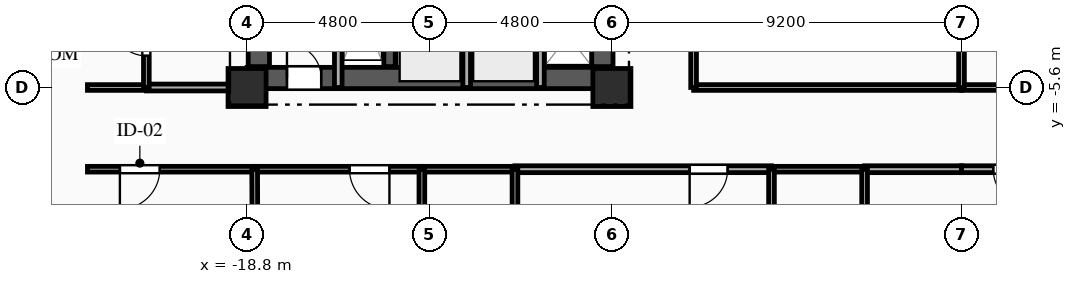
"""IFC4 building model, lengths in metres.
Left out: names, types, materials, properties, quantities, classifications, styles, units other than length and angle.
Written with IfcOpenShell. Run it as: python <this file> out.ifc"""

import sys

from ifc_helpers import new_model, si_unit, direction, frame, frame_2d, origin, origin_2d, place, context, subcontext, project, spatial, rectangle, extrude, element, fill, save


model = new_model("IFC4")
c1 = context("Model", 3, precision=1e-05, world=origin(), true_north=direction((0.0, 1.0)))
c2 = subcontext(c1, "Body", "Model", "MODEL_VIEW")
j1 = project(units=[si_unit("LENGTHUNIT", "METRE"), si_unit("PLANEANGLEUNIT", "RADIAN")], contexts=[c1])
p1 = place(None, origin())
s1 = spatial("IfcSite", under=j1, at=p1, CompositionType="ELEMENT")
p2 = place(p1, origin())
s2 = spatial("IfcBuilding", under=s1, at=p2, CompositionType="ELEMENT")
p3 = place(p2, frame((0.0, 0.0, 89.05)))
s3 = spatial("IfcBuildingStorey", under=s2, at=p3, CompositionType="ELEMENT", Elevation=89.05)
for number, where, z_axis, x_axis in (
    (1, (-18.8, -5.6, 0.0), (0.0, 0.0, 1.0), (1.0, 0.0, 0.0)),
    (2, (-9.2, -5.6, 0.0), (0.0, 0.0, 1.0), (1.0, 0.0, 0.0)),
):
    element("IfcColumn", number, at=place(p3, frame(where, z_axis=z_axis, x_axis=x_axis)), inside=s3, PredefinedType="COLUMN", context=c2, shape_type="SweptSolid", body=[
        extrude(rectangle(XDim=1.0, YDim=1.0, at=origin_2d()), origin(), (0.0, 0.0, 1.0), 3.35),
    ])
p4 = place(p3, frame((-18.8, -5.35, 0.0), z_axis=(0.0, 0.0, 1.0), x_axis=(1.0, 0.0, 0.0)))
e3 = element("IfcWall", 3, at=p4, inside=s3, PredefinedType="SHEAR", context=c2, shape_type="SweptSolid", body=[
    extrude(rectangle(XDim=9.6, YDim=0.56, at=frame_2d((4.8, 0.0))), origin(), (0.0, 0.0, 1.0), 3.045),
])
p5 = place(p4, frame((1.05, 0.0, 0.0)))
e4 = element("IfcOpeningElement", 4, at=p5, cuts=e3, PredefinedType="OPENING", context=c2, shape_type="SweptSolid", body=[
    extrude(rectangle(XDim=0.9, YDim=2.1, at=frame_2d((0.45, 1.05))), frame((0.0, 0.29, 0.0), z_axis=(0.0, -1.0, 0.0), x_axis=(1.0, 0.0, 0.0)), (0.0, 0.0, 1.0), 0.58),
])
p6 = place(p3, frame((-18.49, -5.05, 0.0), z_axis=(0.0, 0.0, 1.0), x_axis=(0.0, 1.0, 0.0)))
e5 = element("IfcWall", 5, at=p6, inside=s3, PredefinedType="SHEAR", context=c2, shape_type="SweptSolid", body=[
    extrude(rectangle(XDim=10.1, YDim=0.56, at=frame_2d((5.05, 0.0))), origin(), (0.0, 0.0, 1.0), 3.045),
])
p7 = place(p3, frame((-9.45, -5.05, 0.0), z_axis=(0.0, 0.0, 1.0), x_axis=(0.0, 1.0, 0.0)))
e6 = element("IfcWall", 6, at=p7, inside=s3, PredefinedType="SHEAR", context=c2, shape_type="SweptSolid", body=[
    extrude(rectangle(XDim=10.1, YDim=0.56, at=frame_2d((5.05, 0.0))), origin(), (0.0, 0.0, 1.0), 3.045),
])
p8 = place(p7, frame((7.15, 0.0, 0.0)))
e7 = element("IfcOpeningElement", 7, at=p8, cuts=e6, PredefinedType="OPENING", context=c2, shape_type="SweptSolid", body=[
    extrude(rectangle(XDim=0.9, YDim=2.1, at=frame_2d((0.45, 1.05))), frame((0.0, 0.29, 0.0), z_axis=(0.0, -1.0, 0.0), x_axis=(1.0, 0.0, 0.0)), (0.0, 0.0, 1.0), 0.58),
])
p9 = place(p7, frame((2.4, 0.0, 0.0)))
e8 = element("IfcOpeningElement", 8, at=p9, cuts=e6, PredefinedType="OPENING", context=c2, shape_type="SweptSolid", body=[
    extrude(rectangle(XDim=1.2, YDim=2.15, at=frame_2d((0.6, 1.075))), frame((0.0, 0.29, 0.0), z_axis=(0.0, -1.0, 0.0), x_axis=(1.0, 0.0, 0.0)), (0.0, 0.0, 1.0), 0.58),
])
p10 = place(p3, frame((-15.05, -5.05, 0.0), z_axis=(0.0, 0.0, 1.0), x_axis=(0.0, 1.0, 0.0)))
e9 = element("IfcWall", 9, at=p10, inside=s3, PredefinedType="SHEAR", context=c2, shape_type="SweptSolid", body=[
    extrude(rectangle(XDim=10.1, YDim=0.3, at=frame_2d((5.05, 0.0))), origin(), (0.0, 0.0, 1.0), 3.045),
])
p11 = place(p3, frame((-16.4, -5.6, 0.0), z_axis=(0.0, 0.0, 1.0), x_axis=(0.0, 1.0, 0.0)))
e10 = element("IfcWall", 10, at=p11, inside=s3, PredefinedType="PARTITIONING", context=c2, shape_type="SweptSolid", body=[
    extrude(rectangle(XDim=3.49, YDim=0.2, at=frame_2d((1.745, 0.0))), origin(), (0.0, 0.0, 1.0), 3.045),
])
for number, where, z_axis, x_axis in (
    (11, (-13.02, -5.6, 0.0), (0.0, 0.0, 1.0), (0.0, 1.0, 0.0)),
    (12, (-11.08, -5.6, 0.0), (0.0, 0.0, 1.0), (0.0, 1.0, 0.0)),
):
    element("IfcWall", number, at=place(p3, frame(where, z_axis=z_axis, x_axis=x_axis)), inside=s3, PredefinedType="PARTITIONING", context=c2, shape_type="SweptSolid", body=[
        extrude(rectangle(XDim=2.25, YDim=0.2, at=frame_2d((1.125, 0.0))), origin(), (0.0, 0.0, 1.0), 3.045),
    ])
p12 = place(p3, frame((-21.45, -5.6, 0.0), z_axis=(0.0, 0.0, 1.0), x_axis=(1.0, 0.0, 0.0)))
e13 = element("IfcWall", 13, at=p12, inside=s3, PredefinedType="PARTITIONING", context=c2, shape_type="SweptSolid", body=[
    extrude(rectangle(XDim=2.65, YDim=0.18, at=frame_2d((1.325, 0.0))), origin(), (0.0, 0.0, 1.0), 3.045),
])
p13 = place(p3, frame((-23.0, -5.6, 0.0), z_axis=(0.0, 0.0, 1.0), x_axis=(1.0, 0.0, 0.0)))
e14 = element("IfcWall", 14, at=p13, inside=s3, PredefinedType="PLUMBINGWALL", context=c2, shape_type="SweptSolid", body=[
    extrude(rectangle(XDim=1.55, YDim=0.15, at=frame_2d((0.775, 0.0))), origin(), (0.0, 0.0, 1.0), 3.045),
])
p14 = place(p3, frame((-18.6, -7.75, 0.0), z_axis=(0.0, 0.0, 1.0), x_axis=(-1.0, 0.0, 0.0)))
e15 = element("IfcWall", 15, at=p14, inside=s3, PredefinedType="PARTITIONING", context=c2, shape_type="SweptSolid", body=[
    extrude(rectangle(XDim=4.4, YDim=0.15, at=frame_2d((2.2, 0.0))), origin(), (0.0, 0.0, 1.0), 3.045),
])
p15 = place(p14, frame((2.496, 0.0, 0.0)))
e16 = element("IfcOpeningElement", 16, at=p15, cuts=e15, PredefinedType="OPENING", context=c2, shape_type="SweptSolid", body=[
    extrude(rectangle(XDim=1.05, YDim=2.15, at=frame_2d((0.525, 1.075))), frame((0.0, 0.085, 0.0), z_axis=(0.0, -1.0, 0.0), x_axis=(1.0, 0.0, 0.0)), (0.0, 0.0, 1.0), 0.17),
])
p16 = place(p3, frame((-14.2, -7.75, 0.0), z_axis=(0.0, 0.0, 1.0), x_axis=(-1.0, 0.0, 0.0)))
e17 = element("IfcWall", 17, at=p16, inside=s3, PredefinedType="PARTITIONING", context=c2, shape_type="SweptSolid", body=[
    extrude(rectangle(XDim=4.4, YDim=0.15, at=frame_2d((2.2, 0.0))), origin(), (0.0, 0.0, 1.0), 3.045),
])
p17 = place(p16, frame((0.854, 0.0, 0.0)))
e18 = element("IfcOpeningElement", 18, at=p17, cuts=e17, PredefinedType="OPENING", context=c2, shape_type="SweptSolid", body=[
    extrude(rectangle(XDim=1.05, YDim=2.15, at=frame_2d((0.525, 1.075))), frame((0.0, 0.085, 0.0), z_axis=(0.0, -1.0, 0.0), x_axis=(1.0, 0.0, 0.0)), (0.0, 0.0, 1.0), 0.17),
])
p18 = place(p3, frame((-5.0, -7.75, 0.0), z_axis=(0.0, 0.0, 1.0), x_axis=(-1.0, 0.0, 0.0)))
e19 = element("IfcWall", 19, at=p18, inside=s3, PredefinedType="PARTITIONING", context=c2, shape_type="SweptSolid", body=[
    extrude(rectangle(XDim=6.75, YDim=0.18, at=frame_2d((3.375, 0.0))), origin(), (0.0, 0.0, 1.0), 3.045),
])
p19 = place(p18, frame((1.154, 0.0, 0.0)))
e20 = element("IfcOpeningElement", 20, at=p19, cuts=e19, PredefinedType="OPENING", context=c2, shape_type="SweptSolid", body=[
    extrude(rectangle(XDim=1.0, YDim=2.15, at=frame_2d((0.5, 1.075))), frame((0.0, 0.1, 0.0), z_axis=(0.0, -1.0, 0.0), x_axis=(1.0, 0.0, 0.0)), (0.0, 0.0, 1.0), 0.2),
])
p20 = place(p3, frame((-11.75, -7.75, 0.0), z_axis=(0.0, 0.0, 1.0), x_axis=(-1.0, 0.0, 0.0)))
e21 = element("IfcWall", 21, at=p20, inside=s3, PredefinedType="PLUMBINGWALL", context=c2, shape_type="SweptSolid", body=[
    extrude(rectangle(XDim=2.45, YDim=0.15, at=frame_2d((1.225, 0.0))), origin(), (0.0, 0.0, 1.0), 3.045),
])
p21 = place(p3, frame((0.0, -7.75, 0.0), z_axis=(0.0, 0.0, 1.0), x_axis=(-1.0, 0.0, 0.0)))
e22 = element("IfcWall", 22, at=p21, inside=s3, PredefinedType="PARTITIONING", context=c2, shape_type="SweptSolid", body=[
    extrude(rectangle(XDim=2.55, YDim=0.18, at=frame_2d((1.275, 0.0))), origin(), (0.0, 0.0, 1.0), 3.045),
])
p22 = place(p3, frame((-2.55, -7.75, 0.0), z_axis=(0.0, 0.0, 1.0), x_axis=(-1.0, 0.0, 0.0)))
e23 = element("IfcWall", 23, at=p22, inside=s3, PredefinedType="PLUMBINGWALL", context=c2, shape_type="SweptSolid", body=[
    extrude(rectangle(XDim=2.45, YDim=0.15, at=frame_2d((1.225, 0.0))), origin(), (0.0, 0.0, 1.0), 3.045),
])
p23 = place(p3, frame((-7.05, -5.6, 0.0), z_axis=(0.0, 0.0, 1.0), x_axis=(1.0, 0.0, 0.0)))
e24 = element("IfcWall", 24, at=p23, inside=s3, PredefinedType="PARTITIONING", context=c2, shape_type="SweptSolid", body=[
    extrude(rectangle(XDim=7.05, YDim=0.15, at=frame_2d((3.525, 0.0))), origin(), (0.0, 0.0, 1.0), 2.53),
])
p24 = place(p3, frame((4.2, -7.75, 0.0), z_axis=(0.0, 0.0, 1.0), x_axis=(-1.0, 0.0, 0.0)))
e25 = element("IfcWall", 25, at=p24, inside=s3, PredefinedType="PARTITIONING", context=c2, shape_type="SweptSolid", body=[
    extrude(rectangle(XDim=4.2, YDim=0.18, at=frame_2d((2.1, 0.0))), origin(), (0.0, 0.0, 1.0), 3.045),
])
p25 = place(p24, frame((2.365, 0.0, 0.0)))
e26 = element("IfcOpeningElement", 26, at=p25, cuts=e25, PredefinedType="OPENING", context=c2, shape_type="SweptSolid", body=[
    extrude(rectangle(XDim=1.0, YDim=2.15, at=frame_2d((0.5, 1.075))), frame((0.0, 0.1, 0.0), z_axis=(0.0, -1.0, 0.0), x_axis=(1.0, 0.0, 0.0)), (0.0, 0.0, 1.0), 0.2),
])
p26 = place(p3, frame((0.0, -5.6, 0.0), z_axis=(0.0, 0.0, 1.0), x_axis=(1.0, 0.0, 0.0)))
e27 = element("IfcWall", 27, at=p26, inside=s3, PredefinedType="PARTITIONING", context=c2, shape_type="SweptSolid", body=[
    extrude(rectangle(XDim=7.05, YDim=0.15, at=frame_2d((3.525, 0.0))), origin(), (0.0, 0.0, 1.0), 2.53),
])
p27 = place(p26, frame((1.185, 0.0, 0.0)))
e28 = element("IfcOpeningElement", 28, at=p27, cuts=e27, PredefinedType="OPENING", context=c2, shape_type="SweptSolid", body=[
    extrude(rectangle(XDim=1.05, YDim=2.15, at=frame_2d((0.525, 1.075))), frame((0.0, 0.085, 0.0), z_axis=(0.0, -1.0, 0.0), x_axis=(1.0, 0.0, 0.0)), (0.0, 0.0, 1.0), 0.17),
])
p28 = place(p3, frame((-7.05, 8.5, 0.0), z_axis=(0.0, 0.0, 1.0), x_axis=(0.0, -1.0, 0.0)))
e29 = element("IfcWall", 29, at=p28, inside=s3, PredefinedType="PARTITIONING", context=c2, shape_type="SweptSolid", body=[
    extrude(rectangle(XDim=14.1, YDim=0.15, at=frame_2d((7.05, 0.0))), origin(), (0.0, 0.0, 1.0), 3.045),
])
p29 = place(p28, frame((8.011, 0.0, 0.0)))
e30 = element("IfcOpeningElement", 30, at=p29, cuts=e29, PredefinedType="OPENING", context=c2, shape_type="SweptSolid", body=[
    extrude(rectangle(XDim=1.05, YDim=2.15, at=frame_2d((0.525, 1.075))), frame((0.0, 0.085, 0.0), z_axis=(0.0, -1.0, 0.0), x_axis=(1.0, 0.0, 0.0)), (0.0, 0.0, 1.0), 0.17),
])
p30 = place(p3, frame((-21.45, -5.6, 0.0), z_axis=(0.0, 0.0, 1.0), x_axis=(0.0, 1.0, 0.0)))
e31 = element("IfcWall", 31, at=p30, inside=s3, PredefinedType="PLUMBINGWALL", context=c2, shape_type="SweptSolid", body=[
    extrude(rectangle(XDim=2.35, YDim=0.15, at=frame_2d((1.175, 0.0))), origin(), (0.0, 0.0, 1.0), 3.045),
])
p31 = place(p30, frame((0.834, 0.0, 0.0)))
e32 = element("IfcOpeningElement", 32, at=p31, cuts=e31, PredefinedType="OPENING", context=c2, shape_type="SweptSolid", body=[
    extrude(rectangle(XDim=0.9, YDim=2.1, at=frame_2d((0.45, 1.05))), frame((0.0, 0.085, 0.0), z_axis=(0.0, -1.0, 0.0), x_axis=(1.0, 0.0, 0.0)), (0.0, 0.0, 1.0), 0.17),
])
p32 = place(p3, frame((-18.6, -7.75, 0.0), z_axis=(0.0, 0.0, 1.0), x_axis=(0.003864456523, -0.99999253296, 0.0)))
e33 = element("IfcWall", 33, at=p32, inside=s3, PredefinedType="PARTITIONING", context=c2, shape_type="SweptSolid", body=[
    extrude(rectangle(XDim=11.372, YDim=0.15, at=frame_2d((5.686, 0.0))), origin(), (0.0, 0.0, 1.0), 3.045),
])
for number, where, z_axis, x_axis in (
    (34, (-14.2, -7.75, 0.0), (0.0, 0.0, 1.0), (0.0, -1.0, 0.0)),
    (35, (-11.75, -9.9, 0.0), (0.0, 0.0, 1.0), (0.0, 1.0, 0.0)),
    (36, (-5.0, -7.75, 0.0), (0.0, 0.0, 1.0), (0.0, -1.0, 0.0)),
    (37, (-2.55, -9.9, 0.0), (0.0, 0.0, 1.0), (0.0, 1.0, 0.0)),
):
    element("IfcWall", number, at=place(p3, frame(where, z_axis=z_axis, x_axis=x_axis)), inside=s3, PredefinedType="PLUMBINGWALL", context=c2, shape_type="SweptSolid", body=[
        extrude(rectangle(XDim=2.15, YDim=0.15, at=frame_2d((1.075, 0.0))), origin(), (0.0, 0.0, 1.0), 3.045),
    ])
p33 = place(p3, frame((0.0, 1.45, 0.0), z_axis=(0.0, 0.0, 1.0), x_axis=(0.0, -1.0, 0.0)))
e38 = element("IfcWall", 38, at=p33, inside=s3, PredefinedType="PARTITIONING", context=c2, shape_type="SweptSolid", body=[
    extrude(rectangle(XDim=7.05, YDim=0.15, at=frame_2d((3.525, 0.0))), origin(), (0.0, 0.0, 1.0), 3.045),
])
p34 = place(p5, origin())
e39 = element("IfcDoor", 39, at=p34, inside=s3, OperationType="SINGLE_SWING_LEFT", PredefinedType="DOOR", context=c2, shape_type="SweptSolid", body=[
    extrude(rectangle(XDim=0.9, YDim=2.1, at=frame_2d((0.45, 1.05))), frame((0.0, 0.025, 0.0), z_axis=(0.0, -1.0, 0.0), x_axis=(1.0, 0.0, 0.0)), (0.0, 0.0, 1.0), 0.05),
])
fill(e4, e39)
p35 = place(p15, origin())
e40 = element("IfcDoor", 40, at=p35, inside=s3, OperationType="SINGLE_SWING_RIGHT", PredefinedType="DOOR", context=c2, shape_type="SweptSolid", body=[
    extrude(rectangle(XDim=1.05, YDim=2.15, at=frame_2d((0.525, 1.075))), frame((0.0, 0.025, 0.0), z_axis=(0.0, -1.0, 0.0), x_axis=(1.0, 0.0, 0.0)), (0.0, 0.0, 1.0), 0.05),
])
fill(e16, e40)
p36 = place(p17, origin())
e41 = element("IfcDoor", 41, at=p36, inside=s3, OperationType="SINGLE_SWING_LEFT", PredefinedType="DOOR", context=c2, shape_type="SweptSolid", body=[
    extrude(rectangle(XDim=1.05, YDim=2.15, at=frame_2d((0.525, 1.075))), frame((0.0, 0.025, 0.0), z_axis=(0.0, -1.0, 0.0), x_axis=(1.0, 0.0, 0.0)), (0.0, 0.0, 1.0), 0.05),
])
fill(e18, e41)
p37 = place(p19, origin())
e42 = element("IfcDoor", 42, at=p37, inside=s3, OperationType="SINGLE_SWING_RIGHT", PredefinedType="DOOR", context=c2, shape_type="SweptSolid", body=[
    extrude(rectangle(XDim=1.0, YDim=2.15, at=frame_2d((0.5, 1.075))), frame((0.0, 0.025, 0.0), z_axis=(0.0, -1.0, 0.0), x_axis=(1.0, 0.0, 0.0)), (0.0, 0.0, 1.0), 0.05),
])
fill(e20, e42)
p38 = place(p25, origin())
e43 = element("IfcDoor", 43, at=p38, inside=s3, OperationType="SINGLE_SWING_LEFT", PredefinedType="DOOR", context=c2, shape_type="SweptSolid", body=[
    extrude(rectangle(XDim=1.0, YDim=2.15, at=frame_2d((0.5, 1.075))), frame((0.0, 0.025, 0.0), z_axis=(0.0, -1.0, 0.0), x_axis=(1.0, 0.0, 0.0)), (0.0, 0.0, 1.0), 0.05),
])
fill(e26, e43)
p39 = place(p31, origin())
e44 = element("IfcDoor", 44, at=p39, inside=s3, OperationType="SINGLE_SWING_RIGHT", PredefinedType="DOOR", context=c2, shape_type="SweptSolid", body=[
    extrude(rectangle(XDim=0.9, YDim=2.1, at=frame_2d((0.45, 1.05))), frame((0.0, 0.025, 0.0), z_axis=(0.0, -1.0, 0.0), x_axis=(1.0, 0.0, 0.0)), (0.0, 0.0, 1.0), 0.05),
])
fill(e32, e44)
save(model, sys.argv[1])
